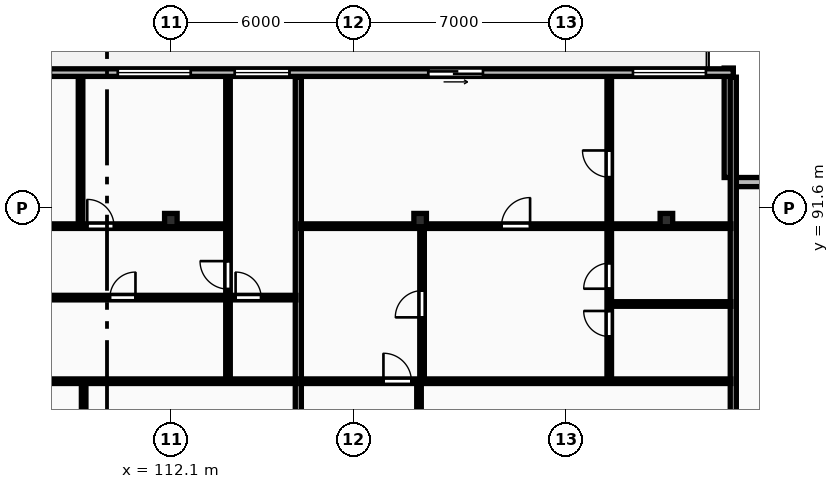
"""IFC4 building model, lengths in metres.
Left out: names, types, materials, properties, quantities, classifications, styles, units other than length and angle.
Written with IfcOpenShell. Run it as: python <this file> out.ifc"""

import sys

from ifc_helpers import new_model, si_unit, direction, frame, frame_2d, origin, origin_2d, place, context, subcontext, project, spatial, rectangle, i_section, extrude, element, fill, save


model = new_model("IFC4")
c1 = context("Model", 3, precision=1e-05, world=origin(), true_north=direction((0.0, 1.0)))
c2 = subcontext(c1, "Body", "Model", "MODEL_VIEW")
j1 = project(units=[si_unit("LENGTHUNIT", "METRE"), si_unit("PLANEANGLEUNIT", "RADIAN")], contexts=[c1])
p1 = place(None, origin())
s1 = spatial("IfcSite", under=j1, at=p1, CompositionType="ELEMENT")
p2 = place(p1, origin())
s2 = spatial("IfcBuilding", under=s1, at=p2, CompositionType="ELEMENT")
p3 = place(p2, frame((0.0, 0.0, 146.5)))
s3 = spatial("IfcBuildingStorey", under=s2, at=p3, CompositionType="ELEMENT", Elevation=146.5)
for number, where, z_axis, x_axis in (
    (1, (112.1, 91.2, 0.0), (0.0, 0.0, 1.0), (1.0, 0.0, 0.0)),
    (2, (120.3, 91.2, 0.0), (0.0, 0.0, 1.0), (1.0, 0.0, 0.0)),
    (3, (128.4, 91.2, 0.0), (0.0, 0.0, 1.0), (1.0, 0.0, 0.0)),
):
    element("IfcColumn", number, at=place(p3, frame(where, z_axis=z_axis, x_axis=x_axis)), inside=s3, PredefinedType="COLUMN", context=c2, shape_type="SweptSolid", body=[
        extrude(i_section(OverallWidth=0.412, OverallDepth=0.437, WebThickness=0.036, FlangeThickness=0.052, FilletRadius=0.015, at=origin_2d()), origin(), (0.0, 0.0, 1.0), 3.6),
    ])
for number, where, z_axis, x_axis in (
    (4, (134.2, 92.45, 0.0), (0.0, 0.0, 1.0), (-1.0, 0.0, 0.0)),
    (5, (130.45, 92.6, 0.0), (0.0, 0.0, 1.0), (0.0, 1.0, 0.0)),
):
    element("IfcWall", number, at=place(p3, frame(where, z_axis=z_axis, x_axis=x_axis)), inside=s3, PredefinedType="STANDARD", context=c2, shape_type="SweptSolid", body=[
        extrude(rectangle(XDim=3.6, YDim=0.3, at=frame_2d((1.8, 0.0))), origin(), (0.0, 0.0, 1.0), 3.31),
    ])
p4 = place(p3, frame((130.6, 96.05, 0.0), z_axis=(0.0, 0.0, 1.0), x_axis=(-1.0, 0.0, 0.0)))
e6 = element("IfcWall", 6, at=p4, inside=s3, PredefinedType="STANDARD", context=c2, shape_type="SweptSolid", body=[
    extrude(rectangle(XDim=73.0, YDim=0.25, at=frame_2d((36.5, 0.0))), origin(), (0.0, 0.0, 1.0), 3.31),
])
p5 = place(p4, frame((67.921, 0.0, 0.0)))
e7 = element("IfcOpeningElement", 7, at=p5, cuts=e6, PredefinedType="OPENING", context=c2, shape_type="SweptSolid", body=[
    extrude(rectangle(XDim=1.8, YDim=2.2, at=frame_2d((0.9, 1.1))), frame((0.0, 0.135, 0.0), z_axis=(0.0, -1.0, 0.0), x_axis=(1.0, 0.0, 0.0)), (0.0, 0.0, 1.0), 0.27),
])
p6 = place(p4, frame((58.084, 0.0, 0.85)))
e8 = element("IfcOpeningElement", 8, at=p6, cuts=e6, PredefinedType="OPENING", context=c2, shape_type="SweptSolid", body=[
    extrude(rectangle(XDim=2.4, YDim=1.9, at=frame_2d((1.2, 0.95))), frame((0.0, 0.135, 0.0), z_axis=(0.0, -1.0, 0.0), x_axis=(1.0, 0.0, 0.0)), (0.0, 0.0, 1.0), 0.27),
])
p7 = place(p4, frame((48.101, 0.0, 0.0)))
e9 = element("IfcOpeningElement", 9, at=p7, cuts=e6, PredefinedType="OPENING", context=c2, shape_type="SweptSolid", body=[
    extrude(rectangle(XDim=1.8, YDim=2.2, at=frame_2d((0.9, 1.1))), frame((0.0, 0.135, 0.0), z_axis=(0.0, -1.0, 0.0), x_axis=(1.0, 0.0, 0.0)), (0.0, 0.0, 1.0), 0.27),
])
p8 = place(p4, frame((37.368, 0.0, 0.85)))
e10 = element("IfcOpeningElement", 10, at=p8, cuts=e6, PredefinedType="OPENING", context=c2, shape_type="SweptSolid", body=[
    extrude(rectangle(XDim=2.4, YDim=1.9, at=frame_2d((1.2, 0.95))), frame((0.0, 0.135, 0.0), z_axis=(0.0, -1.0, 0.0), x_axis=(1.0, 0.0, 0.0)), (0.0, 0.0, 1.0), 0.27),
])
p9 = place(p4, frame((22.445, 0.0, 0.85)))
e11 = element("IfcOpeningElement", 11, at=p9, cuts=e6, PredefinedType="OPENING", context=c2, shape_type="SweptSolid", body=[
    extrude(rectangle(XDim=2.4, YDim=1.9, at=frame_2d((1.2, 0.95))), frame((0.0, 0.135, 0.0), z_axis=(0.0, -1.0, 0.0), x_axis=(1.0, 0.0, 0.0)), (0.0, 0.0, 1.0), 0.27),
])
p10 = place(p4, frame((17.845, 0.0, 0.85)))
e12 = element("IfcOpeningElement", 12, at=p10, cuts=e6, PredefinedType="OPENING", context=c2, shape_type="SweptSolid", body=[
    extrude(rectangle(XDim=2.4, YDim=1.9, at=frame_2d((1.2, 0.95))), frame((0.0, 0.135, 0.0), z_axis=(0.0, -1.0, 0.0), x_axis=(1.0, 0.0, 0.0)), (0.0, 0.0, 1.0), 0.27),
])
p11 = place(p4, frame((28.239, 0.0, 0.0)))
e13 = element("IfcOpeningElement", 13, at=p11, cuts=e6, PredefinedType="OPENING", context=c2, shape_type="SweptSolid", body=[
    extrude(rectangle(XDim=1.8, YDim=2.2, at=frame_2d((0.9, 1.1))), frame((0.0, 0.135, 0.0), z_axis=(0.0, -1.0, 0.0), x_axis=(1.0, 0.0, 0.0)), (0.0, 0.0, 1.0), 0.27),
])
p12 = place(p4, frame((14.599, 0.0, 0.85)))
e14 = element("IfcOpeningElement", 14, at=p12, cuts=e6, PredefinedType="OPENING", context=c2, shape_type="SweptSolid", body=[
    extrude(rectangle(XDim=1.8, YDim=1.8, at=frame_2d((0.9, 0.9))), frame((0.0, 0.135, 0.0), z_axis=(0.0, -1.0, 0.0), x_axis=(1.0, 0.0, 0.0)), (0.0, 0.0, 1.0), 0.27),
])
p13 = place(p4, frame((8.234, 0.0, 0.0)))
e15 = element("IfcOpeningElement", 15, at=p13, cuts=e6, PredefinedType="OPENING", context=c2, shape_type="SweptSolid", body=[
    extrude(rectangle(XDim=1.8, YDim=2.2, at=frame_2d((0.9, 1.1))), frame((0.0, 0.135, 0.0), z_axis=(0.0, -1.0, 0.0), x_axis=(1.0, 0.0, 0.0)), (0.0, 0.0, 1.0), 0.27),
])
p14 = place(p4, frame((0.9, 0.0, 0.85)))
e16 = element("IfcOpeningElement", 16, at=p14, cuts=e6, PredefinedType="OPENING", context=c2, shape_type="SweptSolid", body=[
    extrude(rectangle(XDim=2.4, YDim=1.9, at=frame_2d((1.2, 0.95))), frame((0.0, 0.135, 0.0), z_axis=(0.0, -1.0, 0.0), x_axis=(1.0, 0.0, 0.0)), (0.0, 0.0, 1.0), 0.27),
])
for number, where, z_axis, x_axis in (
    (17, (130.6, 69.83, 0.0), (0.0, 0.0, 1.0), (0.0, 1.0, 0.0)),
    (18, (116.293, 69.83, 0.0), (0.0, 0.0, 1.0), (0.0, 1.0, 0.0)),
):
    element("IfcWall", number, at=place(p3, frame(where, z_axis=z_axis, x_axis=x_axis)), inside=s3, PredefinedType="PARTITIONING", context=c2, shape_type="SweptSolid", body=[
        extrude(rectangle(XDim=26.07, YDim=0.2, at=frame_2d((13.035, 0.0))), origin(), (0.0, 0.0, 1.0), 3.31),
    ])
p15 = place(p3, frame((109.232, 69.81, 0.0), z_axis=(0.0, 0.0, 1.0), x_axis=(0.0, 1.0, 0.0)))
e19 = element("IfcWall", 19, at=p15, inside=s3, PredefinedType="PARTITIONING", context=c2, shape_type="SweptSolid", body=[
    extrude(rectangle(XDim=16.05, YDim=0.15, at=frame_2d((8.025, 0.0))), origin(), (0.0, 0.0, 1.0), 3.31),
])
p16 = place(p15, frame((6.755, 0.0, 0.0)))
e20 = element("IfcOpeningElement", 20, at=p16, cuts=e19, PredefinedType="OPENING", context=c2, shape_type="SweptSolid", body=[
    extrude(rectangle(XDim=0.84, YDim=2.04, at=frame_2d((0.42, 1.02))), frame((0.0, 0.085, 0.0), z_axis=(0.0, -1.0, 0.0), x_axis=(1.0, 0.0, 0.0)), (0.0, 0.0, 1.0), 0.17),
])
p17 = place(p15, frame((8.095, 0.0, 0.0)))
e21 = element("IfcOpeningElement", 21, at=p17, cuts=e19, PredefinedType="OPENING", context=c2, shape_type="SweptSolid", body=[
    extrude(rectangle(XDim=0.88, YDim=2.06, at=frame_2d((0.44, 1.03))), frame((0.0, 0.085, 0.0), z_axis=(0.0, -1.0, 0.0), x_axis=(1.0, 0.0, 0.0)), (0.0, 0.0, 1.0), 0.17),
])
p18 = place(p3, frame((109.13, 91.08, 0.0), z_axis=(0.0, 0.0, 1.0), x_axis=(0.0, 1.0, 0.0)))
e22 = element("IfcWall", 22, at=p18, inside=s3, PredefinedType="PARTITIONING", context=c2, shape_type="SweptSolid", body=[
    extrude(rectangle(XDim=4.82, YDim=0.15, at=frame_2d((2.41, 0.0))), origin(), (0.0, 0.0, 1.0), 3.31),
])
p19 = place(p3, frame((113.98, 85.94, 0.0), z_axis=(0.0, 0.0, 1.0), x_axis=(0.0, 1.0, 0.0)))
e23 = element("IfcWall", 23, at=p19, inside=s3, PredefinedType="PARTITIONING", context=c2, shape_type="SweptSolid", body=[
    extrude(rectangle(XDim=2.69, YDim=0.15, at=frame_2d((1.345, 0.0))), origin(), (0.0, 0.0, 1.0), 3.31),
])
p20 = place(p3, frame((113.98, 88.67, 0.0), z_axis=(0.0, 0.0, 1.0), x_axis=(0.0, 1.0, 0.0)))
e24 = element("IfcWall", 24, at=p20, inside=s3, PredefinedType="PARTITIONING", context=c2, shape_type="SweptSolid", body=[
    extrude(rectangle(XDim=7.23, YDim=0.15, at=frame_2d((3.615, 0.0))), origin(), (0.0, 0.0, 1.0), 3.31),
])
p21 = place(p20, frame((0.26, 0.0, 0.0)))
e25 = element("IfcOpeningElement", 25, at=p21, cuts=e24, PredefinedType="OPENING", context=c2, shape_type="SweptSolid", body=[
    extrude(rectangle(XDim=0.92, YDim=2.08, at=frame_2d((0.46, 1.04))), frame((0.0, 0.085, 0.0), z_axis=(0.0, -1.0, 0.0), x_axis=(1.0, 0.0, 0.0)), (0.0, 0.0, 1.0), 0.17),
])
p22 = place(p3, frame((104.82, 88.65, 0.0), z_axis=(0.0, 0.0, 1.0), x_axis=(1.0, 0.0, 0.0)))
e26 = element("IfcWall", 26, at=p22, inside=s3, PredefinedType="PARTITIONING", context=c2, shape_type="SweptSolid", body=[
    extrude(rectangle(XDim=11.393, YDim=0.15, at=frame_2d((5.696, 0.0))), origin(), (0.0, 0.0, 1.0), 3.31),
])
p23 = place(p22, frame((1.21, 0.0, 0.0)))
e27 = element("IfcOpeningElement", 27, at=p23, cuts=e26, PredefinedType="OPENING", context=c2, shape_type="SweptSolid", body=[
    extrude(rectangle(XDim=0.84, YDim=2.04, at=frame_2d((0.42, 1.02))), frame((0.0, 0.085, 0.0), z_axis=(0.0, -1.0, 0.0), x_axis=(1.0, 0.0, 0.0)), (0.0, 0.0, 1.0), 0.17),
])
p24 = place(p22, frame((5.276, 0.0, 0.0)))
e28 = element("IfcOpeningElement", 28, at=p24, cuts=e26, PredefinedType="OPENING", context=c2, shape_type="SweptSolid", body=[
    extrude(rectangle(XDim=0.84, YDim=2.04, at=frame_2d((0.42, 1.02))), frame((0.0, 0.085, 0.0), z_axis=(0.0, -1.0, 0.0), x_axis=(1.0, 0.0, 0.0)), (0.0, 0.0, 1.0), 0.17),
])
p25 = place(p22, frame((9.41, 0.0, 0.0)))
e29 = element("IfcOpeningElement", 29, at=p25, cuts=e26, PredefinedType="OPENING", context=c2, shape_type="SweptSolid", body=[
    extrude(rectangle(XDim=0.84, YDim=2.04, at=frame_2d((0.42, 1.02))), frame((0.0, 0.085, 0.0), z_axis=(0.0, -1.0, 0.0), x_axis=(1.0, 0.0, 0.0)), (0.0, 0.0, 1.0), 0.17),
])
p26 = place(p3, frame((98.101, 85.9, 0.0), z_axis=(0.0, 0.0, 1.0), x_axis=(1.0, 0.0, 0.0)))
e30 = element("IfcWall", 30, at=p26, inside=s3, PredefinedType="PARTITIONING", context=c2, shape_type="SweptSolid", body=[
    extrude(rectangle(XDim=18.112, YDim=0.15, at=frame_2d((9.056, 0.0))), origin(), (0.0, 0.0, 1.0), 3.31),
])
p27 = place(p26, frame((2.72, 0.0, 0.0)))
e31 = element("IfcOpeningElement", 31, at=p27, cuts=e30, PredefinedType="OPENING", context=c2, shape_type="SweptSolid", body=[
    extrude(rectangle(XDim=0.92, YDim=2.08, at=frame_2d((0.46, 1.04))), frame((0.0, 0.085, 0.0), z_axis=(0.0, -1.0, 0.0), x_axis=(1.0, 0.0, 0.0)), (0.0, 0.0, 1.0), 0.17),
])
p28 = place(p3, frame((98.101, 91.0, 0.0), z_axis=(0.0, 0.0, 1.0), x_axis=(1.0, 0.0, 0.0)))
e32 = element("IfcWall", 32, at=p28, inside=s3, PredefinedType="PARTITIONING", context=c2, shape_type="SweptSolid", body=[
    extrude(rectangle(XDim=15.879, YDim=0.15, at=frame_2d((7.939, 0.0))), origin(), (0.0, 0.0, 1.0), 3.003),
])
p29 = place(p28, frame((2.45, 0.0, 0.0)))
e33 = element("IfcOpeningElement", 33, at=p29, cuts=e32, PredefinedType="OPENING", context=c2, shape_type="SweptSolid", body=[
    extrude(rectangle(XDim=0.94, YDim=2.1, at=frame_2d((0.47, 1.05))), frame((0.0, 0.085, 0.0), z_axis=(0.0, -1.0, 0.0), x_axis=(1.0, 0.0, 0.0)), (0.0, 0.0, 1.0), 0.17),
])
p30 = place(p28, frame((7.499, 0.0, 0.0)))
e34 = element("IfcOpeningElement", 34, at=p30, cuts=e32, PredefinedType="OPENING", context=c2, shape_type="SweptSolid", body=[
    extrude(rectangle(XDim=0.88, YDim=2.06, at=frame_2d((0.44, 1.03))), frame((0.0, 0.085, 0.0), z_axis=(0.0, -1.0, 0.0), x_axis=(1.0, 0.0, 0.0)), (0.0, 0.0, 1.0), 0.17),
])
p31 = place(p28, frame((11.249, 0.0, 0.0)))
e35 = element("IfcOpeningElement", 35, at=p31, cuts=e32, PredefinedType="OPENING", context=c2, shape_type="SweptSolid", body=[
    extrude(rectangle(XDim=0.88, YDim=2.06, at=frame_2d((0.44, 1.03))), frame((0.0, 0.085, 0.0), z_axis=(0.0, -1.0, 0.0), x_axis=(1.0, 0.0, 0.0)), (0.0, 0.0, 1.0), 0.17),
])
p32 = place(p3, frame((120.263, 69.81, 0.0), z_axis=(0.0, 0.0, 1.0), x_axis=(0.0, 1.0, 0.0)))
e36 = element("IfcWall", 36, at=p32, inside=s3, PredefinedType="PARTITIONING", context=c2, shape_type="SweptSolid", body=[
    extrude(rectangle(XDim=16.05, YDim=0.15, at=frame_2d((8.025, 0.0))), origin(), (0.0, 0.0, 1.0), 2.617),
])
p33 = place(p32, frame((6.895, 0.0, 0.0)))
e37 = element("IfcOpeningElement", 37, at=p33, cuts=e36, PredefinedType="OPENING", context=c2, shape_type="SweptSolid", body=[
    extrude(rectangle(XDim=0.88, YDim=2.06, at=frame_2d((0.44, 1.03))), frame((0.0, 0.085, 0.0), z_axis=(0.0, -1.0, 0.0), x_axis=(1.0, 0.0, 0.0)), (0.0, 0.0, 1.0), 0.17),
])
p34 = place(p3, frame((120.363, 85.94, 0.0), z_axis=(0.0, 0.0, 1.0), x_axis=(0.0, 1.0, 0.0)))
e38 = element("IfcWall", 38, at=p34, inside=s3, PredefinedType="PARTITIONING", context=c2, shape_type="SweptSolid", body=[
    extrude(rectangle(XDim=5.0, YDim=0.15, at=frame_2d((2.5, 0.0))), origin(), (0.0, 0.0, 1.0), 2.617),
])
p35 = place(p34, frame((2.06, 0.0, 0.0)))
e39 = element("IfcOpeningElement", 39, at=p35, cuts=e38, PredefinedType="OPENING", context=c2, shape_type="SweptSolid", body=[
    extrude(rectangle(XDim=0.88, YDim=2.06, at=frame_2d((0.44, 1.03))), frame((0.0, 0.085, 0.0), z_axis=(0.0, -1.0, 0.0), x_axis=(1.0, 0.0, 0.0)), (0.0, 0.0, 1.0), 0.17),
])
p36 = place(p3, frame((126.58, 88.44, 0.0), z_axis=(0.0, 0.0, 1.0), x_axis=(1.0, 0.0, 0.0)))
e40 = element("IfcWall", 40, at=p36, inside=s3, PredefinedType="PARTITIONING", context=c2, shape_type="SweptSolid", body=[
    extrude(rectangle(XDim=3.94, YDim=0.15, at=frame_2d((1.97, 0.0))), origin(), (0.0, 0.0, 1.0), 3.31),
])
p37 = place(p3, frame((126.52, 85.94, 0.0), z_axis=(0.0, 0.0, 1.0), x_axis=(0.0, 1.0, 0.0)))
e41 = element("IfcWall", 41, at=p37, inside=s3, PredefinedType="PARTITIONING", context=c2, shape_type="SweptSolid", body=[
    extrude(rectangle(XDim=9.96, YDim=0.15, at=frame_2d((4.98, 0.0))), origin(), (0.0, 0.0, 1.0), 3.31),
])
p38 = place(p37, frame((1.43, 0.0, 0.0)))
e42 = element("IfcOpeningElement", 42, at=p38, cuts=e41, PredefinedType="OPENING", context=c2, shape_type="SweptSolid", body=[
    extrude(rectangle(XDim=0.84, YDim=2.04, at=frame_2d((0.42, 1.02))), frame((0.0, 0.085, 0.0), z_axis=(0.0, -1.0, 0.0), x_axis=(1.0, 0.0, 0.0)), (0.0, 0.0, 1.0), 0.17),
])
p39 = place(p37, frame((3.002, 0.0, 0.0)))
e43 = element("IfcOpeningElement", 43, at=p39, cuts=e41, PredefinedType="OPENING", context=c2, shape_type="SweptSolid", body=[
    extrude(rectangle(XDim=0.84, YDim=2.04, at=frame_2d((0.42, 1.02))), frame((0.0, 0.085, 0.0), z_axis=(0.0, -1.0, 0.0), x_axis=(1.0, 0.0, 0.0)), (0.0, 0.0, 1.0), 0.17),
])
p40 = place(p37, frame((6.669, 0.0, 0.0)))
e44 = element("IfcOpeningElement", 44, at=p40, cuts=e41, PredefinedType="OPENING", context=c2, shape_type="SweptSolid", body=[
    extrude(rectangle(XDim=0.88, YDim=2.06, at=frame_2d((0.44, 1.03))), frame((0.0, 0.085, 0.0), z_axis=(0.0, -1.0, 0.0), x_axis=(1.0, 0.0, 0.0)), (0.0, 0.0, 1.0), 0.17),
])
p41 = place(p3, frame((116.373, 85.9, 0.0), z_axis=(0.0, 0.0, 1.0), x_axis=(1.0, 0.0, 0.0)))
e45 = element("IfcWall", 45, at=p41, inside=s3, PredefinedType="PARTITIONING", context=c2, shape_type="SweptSolid", body=[
    extrude(rectangle(XDim=14.147, YDim=0.15, at=frame_2d((7.074, 0.0))), origin(), (0.0, 0.0, 1.0), 3.31),
])
p42 = place(p41, frame((2.72, 0.0, 0.0)))
e46 = element("IfcOpeningElement", 46, at=p42, cuts=e45, PredefinedType="OPENING", context=c2, shape_type="SweptSolid", body=[
    extrude(rectangle(XDim=0.92, YDim=2.08, at=frame_2d((0.46, 1.04))), frame((0.0, 0.085, 0.0), z_axis=(0.0, -1.0, 0.0), x_axis=(1.0, 0.0, 0.0)), (0.0, 0.0, 1.0), 0.17),
])
p43 = place(p3, frame((116.373, 91.0, 0.0), z_axis=(0.0, 0.0, 1.0), x_axis=(1.0, 0.0, 0.0)))
e47 = element("IfcWall", 47, at=p43, inside=s3, PredefinedType="PARTITIONING", context=c2, shape_type="SweptSolid", body=[
    extrude(rectangle(XDim=14.147, YDim=0.15, at=frame_2d((7.074, 0.0))), origin(), (0.0, 0.0, 1.0), 3.003),
])
p44 = place(p43, frame((6.604, 0.0, 0.0)))
e48 = element("IfcOpeningElement", 48, at=p44, cuts=e47, PredefinedType="OPENING", context=c2, shape_type="SweptSolid", body=[
    extrude(rectangle(XDim=0.94, YDim=2.1, at=frame_2d((0.47, 1.05))), frame((0.0, 0.085, 0.0), z_axis=(0.0, -1.0, 0.0), x_axis=(1.0, 0.0, 0.0)), (0.0, 0.0, 1.0), 0.17),
])
p45 = place(p10, origin())
e49 = element("IfcWindow", 49, at=p45, inside=s3, PartitioningType="DOUBLE_PANEL_VERTICAL", PredefinedType="WINDOW", context=c2, shape_type="SweptSolid", body=[
    extrude(rectangle(XDim=2.4, YDim=1.9, at=frame_2d((1.2, 0.95))), frame((0.0, 0.03, 0.0), z_axis=(0.0, -1.0, 0.0), x_axis=(1.0, 0.0, 0.0)), (0.0, 0.0, 1.0), 0.06),
])
fill(e12, e49)
p46 = place(p12, origin())
e50 = element("IfcWindow", 50, at=p46, inside=s3, PartitioningType="SINGLE_PANEL", PredefinedType="WINDOW", context=c2, shape_type="SweptSolid", body=[
    extrude(rectangle(XDim=1.8, YDim=1.8, at=frame_2d((0.9, 0.9))), frame((0.0, 0.03, 0.0), z_axis=(0.0, -1.0, 0.0), x_axis=(1.0, 0.0, 0.0)), (0.0, 0.0, 1.0), 0.06),
])
fill(e14, e50)
p47 = place(p13, origin())
e51 = element("IfcDoor", 51, at=p47, inside=s3, OperationType="SLIDING_TO_LEFT", PredefinedType="DOOR", context=c2, shape_type="SweptSolid", body=[
    extrude(rectangle(XDim=1.8, YDim=2.2, at=frame_2d((0.9, 1.1))), frame((0.0, 0.025, 0.0), z_axis=(0.0, -1.0, 0.0), x_axis=(1.0, 0.0, 0.0)), (0.0, 0.0, 1.0), 0.05),
])
fill(e15, e51)
p48 = place(p14, origin())
e52 = element("IfcWindow", 52, at=p48, inside=s3, PartitioningType="DOUBLE_PANEL_VERTICAL", PredefinedType="WINDOW", context=c2, shape_type="SweptSolid", body=[
    extrude(rectangle(XDim=2.4, YDim=1.9, at=frame_2d((1.2, 0.95))), frame((0.0, 0.03, 0.0), z_axis=(0.0, -1.0, 0.0), x_axis=(1.0, 0.0, 0.0)), (0.0, 0.0, 1.0), 0.06),
])
fill(e16, e52)
p49 = place(p21, origin())
e53 = element("IfcDoor", 53, at=p49, inside=s3, OperationType="SINGLE_SWING_RIGHT", PredefinedType="DOOR", context=c2, shape_type="SweptSolid", body=[
    extrude(rectangle(XDim=0.92, YDim=2.08, at=frame_2d((0.46, 1.04))), frame((0.0, 0.025, 0.0), z_axis=(0.0, -1.0, 0.0), x_axis=(1.0, 0.0, 0.0)), (0.0, 0.0, 1.0), 0.05),
])
fill(e25, e53)
p50 = place(p24, origin())
e54 = element("IfcDoor", 54, at=p50, inside=s3, OperationType="SINGLE_SWING_RIGHT", PredefinedType="DOOR", context=c2, shape_type="SweptSolid", body=[
    extrude(rectangle(XDim=0.84, YDim=2.04, at=frame_2d((0.42, 1.02))), frame((0.0, 0.025, 0.0), z_axis=(0.0, -1.0, 0.0), x_axis=(1.0, 0.0, 0.0)), (0.0, 0.0, 1.0), 0.05),
])
fill(e28, e54)
p51 = place(p25, origin())
e55 = element("IfcDoor", 55, at=p51, inside=s3, OperationType="SINGLE_SWING_LEFT", PredefinedType="DOOR", context=c2, shape_type="SweptSolid", body=[
    extrude(rectangle(XDim=0.84, YDim=2.04, at=frame_2d((0.42, 1.02))), frame((0.0, 0.025, 0.0), z_axis=(0.0, -1.0, 0.0), x_axis=(1.0, 0.0, 0.0)), (0.0, 0.0, 1.0), 0.05),
])
fill(e29, e55)
p52 = place(p31, origin())
e56 = element("IfcDoor", 56, at=p52, inside=s3, OperationType="SINGLE_SWING_LEFT", PredefinedType="DOOR", context=c2, shape_type="SweptSolid", body=[
    extrude(rectangle(XDim=0.88, YDim=2.06, at=frame_2d((0.44, 1.03))), frame((0.0, 0.025, 0.0), z_axis=(0.0, -1.0, 0.0), x_axis=(1.0, 0.0, 0.0)), (0.0, 0.0, 1.0), 0.05),
])
fill(e35, e56)
p53 = place(p35, origin())
e57 = element("IfcDoor", 57, at=p53, inside=s3, OperationType="SINGLE_SWING_LEFT", PredefinedType="DOOR", context=c2, shape_type="SweptSolid", body=[
    extrude(rectangle(XDim=0.88, YDim=2.06, at=frame_2d((0.44, 1.03))), frame((0.0, 0.025, 0.0), z_axis=(0.0, -1.0, 0.0), x_axis=(1.0, 0.0, 0.0)), (0.0, 0.0, 1.0), 0.05),
])
fill(e39, e57)
p54 = place(p38, origin())
e58 = element("IfcDoor", 58, at=p54, inside=s3, OperationType="SINGLE_SWING_RIGHT", PredefinedType="DOOR", context=c2, shape_type="SweptSolid", body=[
    extrude(rectangle(XDim=0.84, YDim=2.04, at=frame_2d((0.42, 1.02))), frame((0.0, 0.025, 0.0), z_axis=(0.0, -1.0, 0.0), x_axis=(1.0, 0.0, 0.0)), (0.0, 0.0, 1.0), 0.05),
])
fill(e42, e58)
p55 = place(p39, origin())
e59 = element("IfcDoor", 59, at=p55, inside=s3, OperationType="SINGLE_SWING_LEFT", PredefinedType="DOOR", context=c2, shape_type="SweptSolid", body=[
    extrude(rectangle(XDim=0.84, YDim=2.04, at=frame_2d((0.42, 1.02))), frame((0.0, 0.025, 0.0), z_axis=(0.0, -1.0, 0.0), x_axis=(1.0, 0.0, 0.0)), (0.0, 0.0, 1.0), 0.05),
])
fill(e43, e59)
p56 = place(p40, origin())
e60 = element("IfcDoor", 60, at=p56, inside=s3, OperationType="SINGLE_SWING_RIGHT", PredefinedType="DOOR", context=c2, shape_type="SweptSolid", body=[
    extrude(rectangle(XDim=0.88, YDim=2.06, at=frame_2d((0.44, 1.03))), frame((0.0, 0.025, 0.0), z_axis=(0.0, -1.0, 0.0), x_axis=(1.0, 0.0, 0.0)), (0.0, 0.0, 1.0), 0.05),
])
fill(e44, e60)
p57 = place(p42, origin())
e61 = element("IfcDoor", 61, at=p57, inside=s3, OperationType="SINGLE_SWING_LEFT", PredefinedType="DOOR", context=c2, shape_type="SweptSolid", body=[
    extrude(rectangle(XDim=0.92, YDim=2.08, at=frame_2d((0.46, 1.04))), frame((0.0, 0.025, 0.0), z_axis=(0.0, -1.0, 0.0), x_axis=(1.0, 0.0, 0.0)), (0.0, 0.0, 1.0), 0.05),
])
fill(e46, e61)
p58 = place(p44, origin())
e62 = element("IfcDoor", 62, at=p58, inside=s3, OperationType="SINGLE_SWING_RIGHT", PredefinedType="DOOR", context=c2, shape_type="SweptSolid", body=[
    extrude(rectangle(XDim=0.94, YDim=2.1, at=frame_2d((0.47, 1.05))), frame((0.0, 0.025, 0.0), z_axis=(0.0, -1.0, 0.0), x_axis=(1.0, 0.0, 0.0)), (0.0, 0.0, 1.0), 0.05),
])
fill(e48, e62)
save(model, sys.argv[1])
